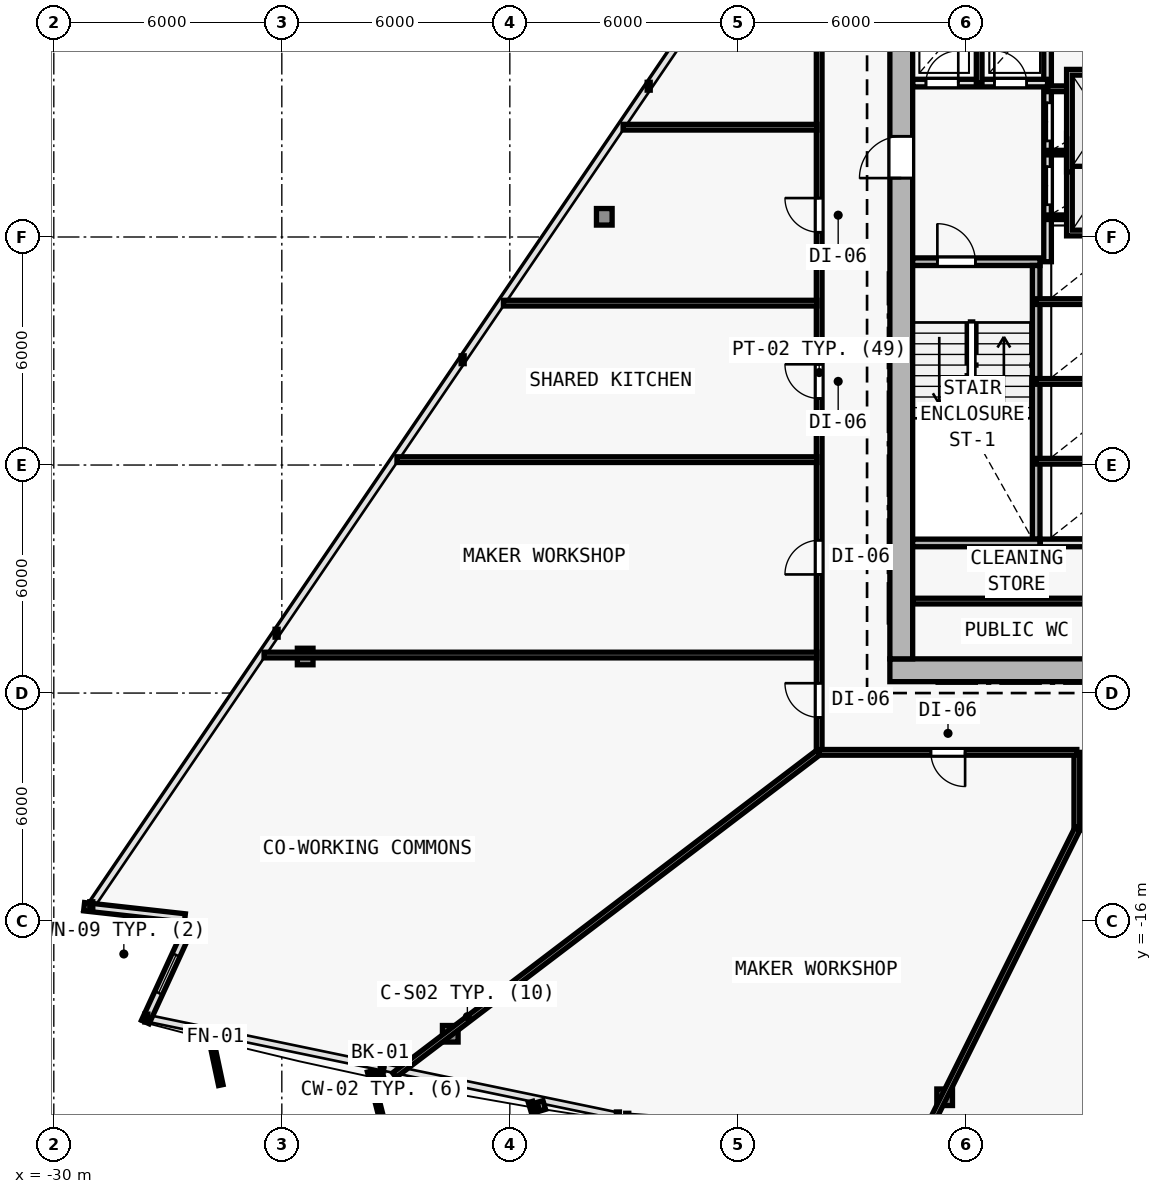
"""IFC4 building model, lengths in metres.
Left out: names, types, materials, properties, quantities, classifications, styles, units other than length and angle.
Written with IfcOpenShell. Run it as: python <this file> out.ifc"""

import sys

from ifc_helpers import new_model, si_unit, direction, frame, frame_2d, origin, origin_2d, place, context, subcontext, project, spatial, rectangle, i_section, extrude, element, fill, save


model = new_model("IFC4")
c1 = context("Model", 3, precision=1e-05, world=origin(), true_north=direction((0.0, 1.0)))
c2 = subcontext(c1, "Body", "Model", "MODEL_VIEW")
j1 = project(units=[si_unit("LENGTHUNIT", "METRE"), si_unit("PLANEANGLEUNIT", "RADIAN")], contexts=[c1])
p1 = place(None, origin())
s1 = spatial("IfcSite", under=j1, at=p1, CompositionType="ELEMENT")
p2 = place(p1, origin())
s2 = spatial("IfcBuilding", under=s1, at=p2, CompositionType="ELEMENT")
p3 = place(p2, frame((0.0, 0.0, 66.0)))
s3 = spatial("IfcBuildingStorey", under=s2, at=p3, CompositionType="ELEMENT", Elevation=66.0)
for number, where, z_axis, x_axis in (
    (1, (-7.7, -9.4, 0.0), (0.0, 0.0, 1.0), (1.0, 0.0, 0.0)),
    (2, (-7.7, 2.0, 0.0), (0.0, 0.0, 1.0), (1.0, 0.0, 0.0)),
):
    element("IfcColumn", number, at=place(p3, frame(where, z_axis=z_axis, x_axis=x_axis)), inside=s3, PredefinedType="COLUMN", context=c2, shape_type="SweptSolid", body=[
        extrude(i_section(OverallWidth=0.416, OverallDepth=0.446, WebThickness=0.025, FlangeThickness=0.04, FilletRadius=0.015, at=origin_2d()), origin(), (0.0, 0.0, 1.0), 3.6),
    ])
p4 = place(p3, frame((-19.568, -18.965, 0.006), z_axis=(0.020596292833, 0.033511459955, 0.999226087917), x_axis=(-0.851954850327, 0.523615252838, 0.0)))
e3 = element("IfcColumn", 3, at=p4, inside=s3, PredefinedType="COLUMN", context=c2, shape_type="SweptSolid", body=[
    extrude(i_section(OverallWidth=0.412, OverallDepth=0.435, WebThickness=0.023, FlangeThickness=0.037, FilletRadius=0.015, at=origin_2d()), origin(), (0.0, 0.0, 1.0), 3.592),
])
p5 = place(p3, frame((-6.558, -20.635, 0.006), z_axis=(0.006934288159, 0.035283289748, 0.999353293441), x_axis=(-0.981229659911, 0.192842823335, 0.0)))
e4 = element("IfcColumn", 4, at=p5, inside=s3, PredefinedType="COLUMN", context=c2, shape_type="SweptSolid", body=[
    extrude(i_section(OverallWidth=0.412, OverallDepth=0.435, WebThickness=0.023, FlangeThickness=0.037, FilletRadius=0.015, at=origin_2d()), origin(), (0.0, 0.0, 1.0), 3.591),
])
p6 = place(p3, frame((-15.515, 2.531, 0.006), z_axis=(0.017003572908, 0.009522000828, 0.999810086971), x_axis=(-0.488603368932, 0.87250601595, 0.0)))
e5 = element("IfcColumn", 5, at=p6, inside=s3, PredefinedType="COLUMN", context=c2, shape_type="SweptSolid", body=[
    extrude(i_section(OverallWidth=0.412, OverallDepth=0.435, WebThickness=0.023, FlangeThickness=0.037, FilletRadius=0.015, at=origin_2d()), origin(), (0.0, 0.0, 1.0), 3.59),
])
p7 = place(p3, frame((-23.385, -9.038, 0.006), z_axis=(0.025224163578, 0.021620711639, 0.999447990843), x_axis=(-0.650791373456, 0.759256602365, 0.0)))
e6 = element("IfcColumn", 6, at=p7, inside=s3, PredefinedType="COLUMN", context=c2, shape_type="SweptSolid", body=[
    extrude(i_section(OverallWidth=0.412, OverallDepth=0.435, WebThickness=0.023, FlangeThickness=0.037, FilletRadius=0.015, at=origin_2d()), origin(), (0.0, 0.0, 1.0), 3.591),
])
p8 = place(p3, frame((-26.55, -15.918, 0.0), z_axis=(0.0, 0.0, 1.0), x_axis=(-0.993824465748, 0.110963648468, 0.0)))
e7 = element("IfcWall", 7, at=p8, inside=s3, PredefinedType="SOLIDWALL", context=c2, shape_type="SweptSolid", body=[
    extrude(rectangle(XDim=2.669, YDim=0.22, at=frame_2d((1.334, 0.0))), origin(), (0.0, 0.0, 1.0), 3.35),
])
p9 = place(p3, frame((-27.593, -18.656, 0.0), z_axis=(0.0, 0.0, 1.0), x_axis=(0.417515840695, 0.908669644463, 0.0)))
e8 = element("IfcWall", 8, at=p9, inside=s3, PredefinedType="SOLIDWALL", context=c2, shape_type="SweptSolid", body=[
    extrude(rectangle(XDim=2.782, YDim=0.22, at=frame_2d((1.391, 0.0))), origin(), (0.0, 0.0, 1.0), 3.35),
])
p10 = place(p9, frame((0.841, 0.0, 0.62)))
e9 = element("IfcOpeningElement", 9, at=p10, cuts=e8, PredefinedType="OPENING", context=c2, shape_type="SweptSolid", body=[
    extrude(rectangle(XDim=1.1, YDim=1.8, at=frame_2d((0.55, 0.9))), frame((0.0, 0.12, 0.0), z_axis=(0.0, -1.0, 0.0), x_axis=(1.0, 0.0, 0.0)), (0.0, 0.0, 1.0), 0.24),
])
p11 = place(p3, frame((-8.0, -9.4, 0.0), z_axis=(0.0, 0.0, 1.0), x_axis=(1.0, 0.0, 0.0)))
e10 = element("IfcWall", 10, at=p11, inside=s3, PredefinedType="SHEAR", context=c2, shape_type="SweptSolid", body=[
    extrude(rectangle(XDim=16.0, YDim=0.6, at=frame_2d((8.0, 0.0))), origin(), (0.0, 0.0, 1.0), 3.35),
])
p12 = place(p11, frame((9.65, 0.0, 0.0)))
e11 = element("IfcOpeningElement", 11, at=p12, cuts=e10, PredefinedType="OPENING", context=c2, shape_type="SweptSolid", body=[
    extrude(rectangle(XDim=1.5, YDim=2.2, at=frame_2d((0.75, 1.1))), frame((0.0, 0.31, 0.0), z_axis=(0.0, -1.0, 0.0), x_axis=(1.0, 0.0, 0.0)), (0.0, 0.0, 1.0), 0.62),
])
p13 = place(p3, frame((-7.7, -9.1, 0.0), z_axis=(0.0, 0.0, 1.0), x_axis=(0.0, 1.0, 0.0)))
e12 = element("IfcWall", 12, at=p13, inside=s3, PredefinedType="SHEAR", context=c2, shape_type="SweptSolid", body=[
    extrude(rectangle(XDim=19.0, YDim=0.6, at=frame_2d((9.5, 0.0))), origin(), (0.0, 0.0, 1.0), 3.35),
])
p14 = place(p13, frame((12.65, 0.0, 0.0)))
e13 = element("IfcOpeningElement", 13, at=p14, cuts=e12, PredefinedType="OPENING", context=c2, shape_type="SweptSolid", body=[
    extrude(rectangle(XDim=1.1, YDim=2.15, at=frame_2d((0.55, 1.075))), frame((0.0, 0.31, 0.0), z_axis=(0.0, -1.0, 0.0), x_axis=(1.0, 0.0, 0.0)), (0.0, 0.0, 1.0), 0.62),
])
p15 = place(p3, frame((-7.4, 1.35, 0.0), z_axis=(0.0, 0.0, 1.0), x_axis=(1.0, 0.0, 0.0)))
e14 = element("IfcWall", 14, at=p15, inside=s3, PredefinedType="SOLIDWALL", context=c2, shape_type="SweptSolid", body=[
    extrude(rectangle(XDim=3.35, YDim=0.2, at=frame_2d((1.675, 0.0))), origin(), (0.0, 0.0, 1.0), 3.35),
])
p16 = place(p15, frame((0.65, 0.0, 0.0)))
e15 = element("IfcOpeningElement", 15, at=p16, cuts=e14, PredefinedType="OPENING", context=c2, shape_type="SweptSolid", body=[
    extrude(rectangle(XDim=1.0, YDim=2.15, at=frame_2d((0.5, 1.075))), frame((0.0, 0.11, 0.0), z_axis=(0.0, -1.0, 0.0), x_axis=(1.0, 0.0, 0.0)), (0.0, 0.0, 1.0), 0.22),
])
p17 = place(p3, frame((-4.15, -5.95, 0.0), z_axis=(0.0, 0.0, 1.0), x_axis=(0.0, 1.0, 0.0)))
e16 = element("IfcWall", 16, at=p17, inside=s3, PredefinedType="SOLIDWALL", context=c2, shape_type="SweptSolid", body=[
    extrude(rectangle(XDim=7.2, YDim=0.2, at=frame_2d((3.6, 0.0))), origin(), (0.0, 0.0, 1.0), 3.35),
])
p18 = place(p3, frame((-3.85, 1.35, 0.0), z_axis=(0.0, 0.0, 1.0), x_axis=(0.0, 1.0, 0.0)))
e17 = element("IfcWall", 17, at=p18, inside=s3, PredefinedType="SOLIDWALL", context=c2, shape_type="SweptSolid", body=[
    extrude(rectangle(XDim=8.545, YDim=0.2, at=frame_2d((4.272, 0.0))), origin(), (0.0, 0.0, 1.0), 3.35),
])
p19 = place(p18, frame((1.5, 0.0, 0.0)))
e18 = element("IfcOpeningElement", 18, at=p19, cuts=e17, PredefinedType="OPENING", context=c2, shape_type="SweptSolid", body=[
    extrude(rectangle(XDim=1.0, YDim=2.15, at=frame_2d((0.5, 1.075))), frame((0.0, 0.11, 0.0), z_axis=(0.0, -1.0, 0.0), x_axis=(1.0, 0.0, 0.0)), (0.0, 0.0, 1.0), 0.22),
])
p20 = place(p18, frame((3.18, 0.0, 0.0)))
e19 = element("IfcOpeningElement", 19, at=p20, cuts=e17, PredefinedType="OPENING", context=c2, shape_type="SweptSolid", body=[
    extrude(rectangle(XDim=1.0, YDim=2.15, at=frame_2d((0.5, 1.075))), frame((0.0, 0.11, 0.0), z_axis=(0.0, -1.0, 0.0), x_axis=(1.0, 0.0, 0.0)), (0.0, 0.0, 1.0), 0.22),
])
p21 = place(p3, frame((-7.395, 6.05, 0.0), z_axis=(0.0, 0.0, 1.0), x_axis=(1.0, 0.0, 0.0)))
e20 = element("IfcWall", 20, at=p21, inside=s3, PredefinedType="SOLIDWALL", context=c2, shape_type="SweptSolid", body=[
    extrude(rectangle(XDim=3.545, YDim=0.2, at=frame_2d((1.772, 0.0))), origin(), (0.0, 0.0, 1.0), 3.35),
])
p22 = place(p21, frame((0.345, 0.0, 0.0)))
e21 = element("IfcOpeningElement", 21, at=p22, cuts=e20, PredefinedType="OPENING", context=c2, shape_type="SweptSolid", body=[
    extrude(rectangle(XDim=0.85, YDim=2.1, at=frame_2d((0.425, 1.05))), frame((0.0, 0.11, 0.0), z_axis=(0.0, -1.0, 0.0), x_axis=(1.0, 0.0, 0.0)), (0.0, 0.0, 1.0), 0.22),
])
p23 = place(p21, frame((2.145, 0.0, 0.0)))
e22 = element("IfcOpeningElement", 22, at=p23, cuts=e20, PredefinedType="OPENING", context=c2, shape_type="SweptSolid", body=[
    extrude(rectangle(XDim=0.85, YDim=2.1, at=frame_2d((0.425, 1.05))), frame((0.0, 0.11, 0.0), z_axis=(0.0, -1.0, 0.0), x_axis=(1.0, 0.0, 0.0)), (0.0, 0.0, 1.0), 0.22),
])
p24 = place(p3, frame((-5.65, 6.05, 0.0), z_axis=(0.0, 0.0, 1.0), x_axis=(0.0, 1.0, 0.0)))
e23 = element("IfcWall", 23, at=p24, inside=s3, PredefinedType="PARTITIONING", context=c2, shape_type="SweptSolid", body=[
    extrude(rectangle(XDim=2.05, YDim=0.15, at=frame_2d((1.025, 0.0))), origin(), (0.0, 0.0, 1.0), 3.35),
])
for number, where, z_axis, x_axis in (
    (24, (-3.85, 2.52, 0.0), (0.0, 0.0, 1.0), (1.0, 0.0, 0.0)),
    (25, (-3.85, 4.22, 0.0), (0.0, 0.0, 1.0), (1.0, 0.0, 0.0)),
):
    element("IfcWall", number, at=place(p3, frame(where, z_axis=z_axis, x_axis=x_axis)), inside=s3, PredefinedType="PARTITIONING", context=c2, shape_type="SweptSolid", body=[
        extrude(rectangle(XDim=2.9, YDim=0.12, at=frame_2d((1.45, 0.0))), origin(), (0.0, 0.0, 1.0), 3.35),
    ])
p25 = place(p3, frame((-3.85, 5.9, 0.0), z_axis=(0.0, 0.0, 1.0), x_axis=(1.0, 0.0, 0.0)))
e26 = element("IfcWall", 26, at=p25, inside=s3, PredefinedType="PARTITIONING", context=c2, shape_type="SweptSolid", body=[
    extrude(rectangle(XDim=2.9, YDim=0.15, at=frame_2d((1.45, 0.0))), origin(), (0.0, 0.0, 1.0), 3.35),
])
for number, where, z_axis, x_axis in (
    (27, (-4.15, -3.9, 0.0), (0.0, 0.0, 1.0), (1.0, 0.0, 0.0)),
    (28, (-4.15, -1.8, 0.0), (0.0, 0.0, 1.0), (1.0, 0.0, 0.0)),
    (29, (-4.15, 0.3, 0.0), (0.0, 0.0, 1.0), (1.0, 0.0, 0.0)),
):
    element("IfcWall", number, at=place(p3, frame(where, z_axis=z_axis, x_axis=x_axis)), inside=s3, PredefinedType="PARTITIONING", context=c2, shape_type="SweptSolid", body=[
        extrude(rectangle(XDim=2.9, YDim=0.15, at=frame_2d((1.45, 0.0))), origin(), (0.0, 0.0, 1.0), 3.35),
    ])
p26 = place(p3, frame((-7.4, -6.05, 0.0), z_axis=(0.0, 0.0, 1.0), x_axis=(1.0, 0.0, 0.0)))
e30 = element("IfcWall", 30, at=p26, inside=s3, PredefinedType="SOLIDWALL", context=c2, shape_type="SweptSolid", body=[
    extrude(rectangle(XDim=3.35, YDim=0.2, at=frame_2d((1.675, 0.0))), origin(), (0.0, 0.0, 1.0), 3.35),
])
p27 = place(p3, frame((-4.04, -6.05, 0.0), z_axis=(0.0, 0.0, 1.0), x_axis=(1.0, 0.0, 0.0)))
e31 = element("IfcWall", 31, at=p27, inside=s3, PredefinedType="SOLIDWALL", context=c2, shape_type="SweptSolid", body=[
    extrude(rectangle(XDim=2.79, YDim=0.2, at=frame_2d((1.395, 0.0))), origin(), (0.0, 0.0, 1.0), 3.35),
])
p28 = place(p3, frame((-7.395, -7.58, 0.0), z_axis=(0.0, 0.0, 1.0), x_axis=(1.0, 0.0, 0.0)))
e32 = element("IfcWall", 32, at=p28, inside=s3, PredefinedType="PARTITIONING", context=c2, shape_type="SweptSolid", body=[
    extrude(rectangle(XDim=6.145, YDim=0.15, at=frame_2d((3.073, 0.0))), origin(), (0.0, 0.0, 1.0), 3.35),
])
p29 = place(p3, frame((-9.86, -11.56, 0.0), z_axis=(0.0, 0.0, 1.0), x_axis=(0.0, 1.0, 0.0)))
e33 = element("IfcWall", 33, at=p29, inside=s3, PredefinedType="PARTITIONING", context=c2, shape_type="SweptSolid", body=[
    extrude(rectangle(XDim=19.986, YDim=0.15, at=frame_2d((9.993, 0.0))), origin(), (0.0, 0.0, 1.0), 2.609),
])
p30 = place(p29, frame((9.311, 0.0, 0.0)))
e34 = element("IfcOpeningElement", 34, at=p30, cuts=e33, PredefinedType="OPENING", context=c2, shape_type="SweptSolid", body=[
    extrude(rectangle(XDim=0.9, YDim=2.1, at=frame_2d((0.45, 1.05))), frame((0.0, 0.085, 0.0), z_axis=(0.0, -1.0, 0.0), x_axis=(1.0, 0.0, 0.0)), (0.0, 0.0, 1.0), 0.17),
])
p31 = place(p29, frame((4.681, 0.0, 0.0)))
e35 = element("IfcOpeningElement", 35, at=p31, cuts=e33, PredefinedType="OPENING", context=c2, shape_type="SweptSolid", body=[
    extrude(rectangle(XDim=0.9, YDim=2.1, at=frame_2d((0.45, 1.05))), frame((0.0, 0.085, 0.0), z_axis=(0.0, -1.0, 0.0), x_axis=(1.0, 0.0, 0.0)), (0.0, 0.0, 1.0), 0.17),
])
p32 = place(p29, frame((0.919, 0.0, 0.0)))
e36 = element("IfcOpeningElement", 36, at=p32, cuts=e33, PredefinedType="OPENING", context=c2, shape_type="SweptSolid", body=[
    extrude(rectangle(XDim=0.9, YDim=2.1, at=frame_2d((0.45, 1.05))), frame((0.0, 0.085, 0.0), z_axis=(0.0, -1.0, 0.0), x_axis=(1.0, 0.0, 0.0)), (0.0, 0.0, 1.0), 0.17),
])
p33 = place(p29, frame((13.684, 0.0, 0.0)))
e37 = element("IfcOpeningElement", 37, at=p33, cuts=e33, PredefinedType="OPENING", context=c2, shape_type="SweptSolid", body=[
    extrude(rectangle(XDim=0.9, YDim=2.1, at=frame_2d((0.45, 1.05))), frame((0.0, 0.085, 0.0), z_axis=(0.0, -1.0, 0.0), x_axis=(1.0, 0.0, 0.0)), (0.0, 0.0, 1.0), 0.17),
])
p34 = place(p3, frame((3.08, -13.53, 0.0), z_axis=(0.0, 0.0, 1.0), x_axis=(-1.0, 0.0, 0.0)))
e38 = element("IfcWall", 38, at=p34, inside=s3, PredefinedType="PARTITIONING", context=c2, shape_type="SweptSolid", body=[
    extrude(rectangle(XDim=6.16, YDim=0.15, at=frame_2d((3.08, 0.0))), origin(), (0.0, 0.0, 1.0), 2.725),
])
p35 = place(p34, frame((2.63, 0.0, 0.0)))
e39 = element("IfcOpeningElement", 39, at=p35, cuts=e38, PredefinedType="OPENING", context=c2, shape_type="SweptSolid", body=[
    extrude(rectangle(XDim=0.9, YDim=2.1, at=frame_2d((0.45, 1.05))), frame((0.0, 0.085, 0.0), z_axis=(0.0, -1.0, 0.0), x_axis=(1.0, 0.0, 0.0)), (0.0, 0.0, 1.0), 0.17),
])
p36 = place(p3, frame((-3.08, -13.53, 0.0), z_axis=(0.0, 0.0, 1.0), x_axis=(0.0, 1.0, 0.0)))
e40 = element("IfcWall", 40, at=p36, inside=s3, PredefinedType="PARTITIONING", context=c2, shape_type="SweptSolid", body=[
    extrude(rectangle(XDim=1.97, YDim=0.15, at=frame_2d((0.985, 0.0))), origin(), (0.0, 0.0, 1.0), 2.775),
])
p37 = place(p3, frame((-3.08, -11.56, 0.0), z_axis=(0.0, 0.0, 1.0), x_axis=(-1.0, 0.0, 0.0)))
e41 = element("IfcWall", 41, at=p37, inside=s3, PredefinedType="PARTITIONING", context=c2, shape_type="SweptSolid", body=[
    extrude(rectangle(XDim=6.78, YDim=0.15, at=frame_2d((3.39, 0.0))), origin(), (0.0, 0.0, 1.0), 3.35),
])
p38 = place(p37, frame((2.94, 0.0, 0.0)))
e42 = element("IfcOpeningElement", 42, at=p38, cuts=e41, PredefinedType="OPENING", context=c2, shape_type="SweptSolid", body=[
    extrude(rectangle(XDim=0.9, YDim=2.1, at=frame_2d((0.45, 1.05))), frame((0.0, 0.085, 0.0), z_axis=(0.0, -1.0, 0.0), x_axis=(1.0, 0.0, 0.0)), (0.0, 0.0, 1.0), 0.17),
])
p39 = place(p3, frame((-9.888, -11.569, 0.0), z_axis=(0.0, 0.0, 1.0), x_axis=(-0.795860269097, -0.605480331698, 0.0)))
e43 = element("IfcWall", 43, at=p39, inside=s3, PredefinedType="PARTITIONING", context=c2, shape_type="SweptSolid", body=[
    extrude(rectangle(XDim=14.013, YDim=0.15, at=frame_2d((7.006, 0.0))), origin(), (0.0, 0.0, 1.0), 2.725),
])
p40 = place(p3, frame((-3.066, -13.573, 0.0), z_axis=(0.0, 0.0, 1.0), x_axis=(-0.445213283885, -0.89542455397, 0.0)))
e44 = element("IfcWall", 44, at=p40, inside=s3, PredefinedType="PARTITIONING", context=c2, shape_type="SweptSolid", body=[
    extrude(rectangle(XDim=9.33, YDim=0.15, at=frame_2d((4.665, 0.0))), origin(), (0.0, 0.0, 1.0), 2.725),
])
p41 = place(p3, frame((-9.92, -9.0, 0.0), z_axis=(0.0, 0.0, 1.0), x_axis=(-1.0, 0.0, 0.0)))
e45 = element("IfcWall", 45, at=p41, inside=s3, PredefinedType="PARTITIONING", context=c2, shape_type="SweptSolid", body=[
    extrude(rectangle(XDim=14.547, YDim=0.15, at=frame_2d((7.273, 0.0))), origin(), (0.0, 0.0, 1.0), 2.609),
])
p42 = place(p3, frame((-9.92, 0.26, 0.0), z_axis=(0.0, 0.0, 1.0), x_axis=(-1.0, 0.0, 0.0)))
e46 = element("IfcWall", 46, at=p42, inside=s3, PredefinedType="PARTITIONING", context=c2, shape_type="SweptSolid", body=[
    extrude(rectangle(XDim=8.248, YDim=0.15, at=frame_2d((4.124, 0.0))), origin(), (0.0, 0.0, 1.0), 2.725),
])
p43 = place(p3, frame((-9.92, -3.858, 0.0), z_axis=(0.0, 0.0, 1.0), x_axis=(-1.0, 0.0, 0.0)))
e47 = element("IfcWall", 47, at=p43, inside=s3, PredefinedType="PARTITIONING", context=c2, shape_type="SweptSolid", body=[
    extrude(rectangle(XDim=11.05, YDim=0.15, at=frame_2d((5.525, 0.0))), origin(), (0.0, 0.0, 1.0), 2.725),
])
p44 = place(p3, frame((-9.92, 4.889, 0.0), z_axis=(0.0, 0.0, 1.0), x_axis=(-1.0, 0.0, 0.0)))
e48 = element("IfcWall", 48, at=p44, inside=s3, PredefinedType="PARTITIONING", context=c2, shape_type="SweptSolid", body=[
    extrude(rectangle(XDim=5.099, YDim=0.15, at=frame_2d((2.549, 0.0))), origin(), (0.0, 0.0, 1.0), 2.735),
])
p45 = place(p10, origin())
e49 = element("IfcWindow", 49, at=p45, inside=s3, PartitioningType="SINGLE_PANEL", PredefinedType="WINDOW", context=c2, shape_type="SweptSolid", body=[
    extrude(rectangle(XDim=1.1, YDim=1.8, at=frame_2d((0.55, 0.9))), frame((0.0, 0.03, 0.0), z_axis=(0.0, -1.0, 0.0), x_axis=(1.0, 0.0, 0.0)), (0.0, 0.0, 1.0), 0.06),
])
fill(e9, e49)
p46 = place(p14, origin())
e50 = element("IfcDoor", 50, at=p46, inside=s3, OperationType="SINGLE_SWING_LEFT", PredefinedType="DOOR", context=c2, shape_type="SweptSolid", body=[
    extrude(rectangle(XDim=1.1, YDim=2.15, at=frame_2d((0.55, 1.075))), frame((0.0, 0.025, 0.0), z_axis=(0.0, -1.0, 0.0), x_axis=(1.0, 0.0, 0.0)), (0.0, 0.0, 1.0), 0.05),
])
fill(e13, e50)
p47 = place(p16, origin())
e51 = element("IfcDoor", 51, at=p47, inside=s3, OperationType="SINGLE_SWING_LEFT", PredefinedType="DOOR", context=c2, shape_type="SweptSolid", body=[
    extrude(rectangle(XDim=1.0, YDim=2.15, at=frame_2d((0.5, 1.075))), frame((0.0, 0.025, 0.0), z_axis=(0.0, -1.0, 0.0), x_axis=(1.0, 0.0, 0.0)), (0.0, 0.0, 1.0), 0.05),
])
fill(e15, e51)
p48 = place(p22, origin())
e52 = element("IfcDoor", 52, at=p48, inside=s3, OperationType="SINGLE_SWING_RIGHT", PredefinedType="DOOR", context=c2, shape_type="SweptSolid", body=[
    extrude(rectangle(XDim=0.85, YDim=2.1, at=frame_2d((0.425, 1.05))), frame((0.0, 0.025, 0.0), z_axis=(0.0, -1.0, 0.0), x_axis=(1.0, 0.0, 0.0)), (0.0, 0.0, 1.0), 0.05),
])
fill(e21, e52)
p49 = place(p23, origin())
e53 = element("IfcDoor", 53, at=p49, inside=s3, OperationType="SINGLE_SWING_LEFT", PredefinedType="DOOR", context=c2, shape_type="SweptSolid", body=[
    extrude(rectangle(XDim=0.85, YDim=2.1, at=frame_2d((0.425, 1.05))), frame((0.0, 0.025, 0.0), z_axis=(0.0, -1.0, 0.0), x_axis=(1.0, 0.0, 0.0)), (0.0, 0.0, 1.0), 0.05),
])
fill(e22, e53)
p50 = place(p19, origin())
e54 = element("IfcDoor", 54, at=p50, inside=s3, OperationType="DOUBLE_DOOR_SLIDING", PredefinedType="DOOR", context=c2, shape_type="SweptSolid", body=[
    extrude(rectangle(XDim=1.0, YDim=2.15, at=frame_2d((0.5, 1.075))), frame((0.0, 0.025, 0.0), z_axis=(0.0, -1.0, 0.0), x_axis=(1.0, 0.0, 0.0)), (0.0, 0.0, 1.0), 0.05),
])
fill(e18, e54)
p51 = place(p20, origin())
e55 = element("IfcDoor", 55, at=p51, inside=s3, OperationType="DOUBLE_DOOR_SLIDING", PredefinedType="DOOR", context=c2, shape_type="SweptSolid", body=[
    extrude(rectangle(XDim=1.0, YDim=2.15, at=frame_2d((0.5, 1.075))), frame((0.0, 0.025, 0.0), z_axis=(0.0, -1.0, 0.0), x_axis=(1.0, 0.0, 0.0)), (0.0, 0.0, 1.0), 0.05),
])
fill(e19, e55)
p52 = place(p30, origin())
e56 = element("IfcDoor", 56, at=p52, inside=s3, OperationType="SINGLE_SWING_RIGHT", PredefinedType="DOOR", context=c2, shape_type="SweptSolid", body=[
    extrude(rectangle(XDim=0.9, YDim=2.1, at=frame_2d((0.45, 1.05))), frame((0.0, 0.025, 0.0), z_axis=(0.0, -1.0, 0.0), x_axis=(1.0, 0.0, 0.0)), (0.0, 0.0, 1.0), 0.05),
])
fill(e34, e56)
p53 = place(p31, origin())
e57 = element("IfcDoor", 57, at=p53, inside=s3, OperationType="SINGLE_SWING_LEFT", PredefinedType="DOOR", context=c2, shape_type="SweptSolid", body=[
    extrude(rectangle(XDim=0.9, YDim=2.1, at=frame_2d((0.45, 1.05))), frame((0.0, 0.025, 0.0), z_axis=(0.0, -1.0, 0.0), x_axis=(1.0, 0.0, 0.0)), (0.0, 0.0, 1.0), 0.05),
])
fill(e35, e57)
p54 = place(p32, origin())
e58 = element("IfcDoor", 58, at=p54, inside=s3, OperationType="SINGLE_SWING_RIGHT", PredefinedType="DOOR", context=c2, shape_type="SweptSolid", body=[
    extrude(rectangle(XDim=0.9, YDim=2.1, at=frame_2d((0.45, 1.05))), frame((0.0, 0.025, 0.0), z_axis=(0.0, -1.0, 0.0), x_axis=(1.0, 0.0, 0.0)), (0.0, 0.0, 1.0), 0.05),
])
fill(e36, e58)
p55 = place(p38, origin())
e59 = element("IfcDoor", 59, at=p55, inside=s3, OperationType="SINGLE_SWING_LEFT", PredefinedType="DOOR", context=c2, shape_type="SweptSolid", body=[
    extrude(rectangle(XDim=0.9, YDim=2.1, at=frame_2d((0.45, 1.05))), frame((0.0, 0.025, 0.0), z_axis=(0.0, -1.0, 0.0), x_axis=(1.0, 0.0, 0.0)), (0.0, 0.0, 1.0), 0.05),
])
fill(e42, e59)
p56 = place(p33, origin())
e60 = element("IfcDoor", 60, at=p56, inside=s3, OperationType="SINGLE_SWING_RIGHT", PredefinedType="DOOR", context=c2, shape_type="SweptSolid", body=[
    extrude(rectangle(XDim=0.9, YDim=2.1, at=frame_2d((0.45, 1.05))), frame((0.0, 0.025, 0.0), z_axis=(0.0, -1.0, 0.0), x_axis=(1.0, 0.0, 0.0)), (0.0, 0.0, 1.0), 0.05),
])
fill(e37, e60)
save(model, sys.argv[1])
